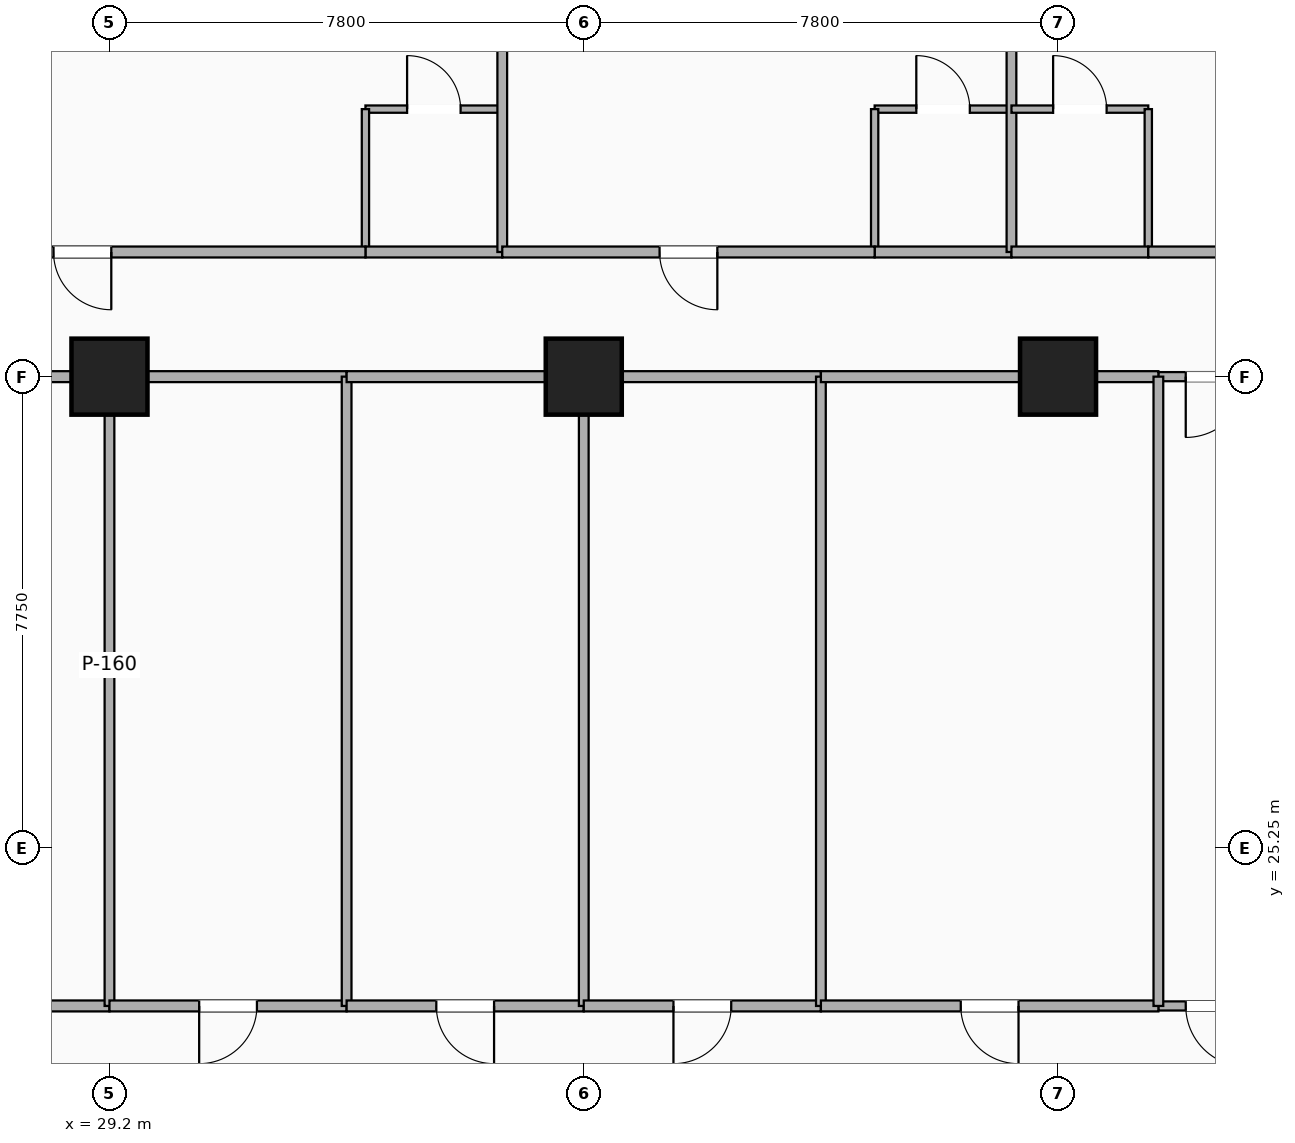
"""IFC4 building model, lengths in metres.
Left out: names, types, materials, properties, quantities, classifications, styles, units other than length and angle.
Written with IfcOpenShell. Run it as: python <this file> out.ifc"""

import sys

from ifc_helpers import new_model, si_unit, direction, frame, frame_2d, origin, origin_2d, place, context, subcontext, project, spatial, rectangle, extrude, element, fill, save


model = new_model("IFC4")
c1 = context("Model", 3, precision=1e-05, world=origin(), true_north=direction((0.0, 1.0)))
c2 = subcontext(c1, "Body", "Model", "MODEL_VIEW")
j1 = project(units=[si_unit("LENGTHUNIT", "METRE"), si_unit("PLANEANGLEUNIT", "RADIAN")], contexts=[c1])
p1 = place(None, origin())
s1 = spatial("IfcSite", under=j1, at=p1, CompositionType="ELEMENT")
p2 = place(p1, origin())
s2 = spatial("IfcBuilding", under=s1, at=p2, CompositionType="ELEMENT")
p3 = place(p2, frame((0.0, 0.0, 91.7)))
s3 = spatial("IfcBuildingStorey", under=s2, at=p3, CompositionType="ELEMENT", Elevation=91.7)
for number, where, z_axis, x_axis in (
    (1, (29.2, 33.0, -0.26), (0.0, 0.0, 1.0), (1.0, 0.0, 0.0)),
    (2, (37.0, 33.0, -0.26), (0.0, 0.0, 1.0), (1.0, 0.0, 0.0)),
    (3, (44.8, 33.0, -0.26), (0.0, 0.0, 1.0), (1.0, 0.0, 0.0)),
):
    element("IfcColumn", number, at=place(p3, frame(where, z_axis=z_axis, x_axis=x_axis)), inside=s3, PredefinedType="COLUMN", context=c2, shape_type="SweptSolid", body=[
        extrude(rectangle(XDim=1.25, YDim=1.25, at=origin_2d()), origin(), (0.0, 0.0, 1.0), 3.5),
    ])
p4 = place(p3, frame((46.45, 22.65, 0.0), z_axis=(0.0, 0.0, 1.0), x_axis=(1.0, 0.0, 0.0)))
e4 = element("IfcWall", 4, at=p4, inside=s3, PredefinedType="PARTITIONING", context=c2, shape_type="SweptSolid", body=[
    extrude(rectangle(XDim=2.0, YDim=0.15, at=frame_2d((1.0, 0.0))), origin(), (0.0, 0.0, 1.0), 3.24),
])
p5 = place(p4, frame((0.45, 0.0, 0.0)))
e5 = element("IfcOpeningElement", 5, at=p5, cuts=e4, PredefinedType="OPENING", context=c2, shape_type="SweptSolid", body=[
    extrude(rectangle(XDim=1.0, YDim=2.15, at=frame_2d((0.5, 1.075))), frame((0.0, 0.085, 0.0), z_axis=(0.0, -1.0, 0.0), x_axis=(1.0, 0.0, 0.0)), (0.0, 0.0, 1.0), 0.17),
])
p6 = place(p3, frame((46.45, 33.0, 0.0), z_axis=(0.0, 0.0, 1.0), x_axis=(1.0, 0.0, 0.0)))
e6 = element("IfcWall", 6, at=p6, inside=s3, PredefinedType="PARTITIONING", context=c2, shape_type="SweptSolid", body=[
    extrude(rectangle(XDim=2.0, YDim=0.15, at=frame_2d((1.0, 0.0))), origin(), (0.0, 0.0, 1.0), 2.313),
])
p7 = place(p6, frame((0.45, 0.0, 0.0)))
e7 = element("IfcOpeningElement", 7, at=p7, cuts=e6, PredefinedType="OPENING", context=c2, shape_type="SweptSolid", body=[
    extrude(rectangle(XDim=1.0, YDim=2.15, at=frame_2d((0.5, 1.075))), frame((0.0, 0.085, 0.0), z_axis=(0.0, -1.0, 0.0), x_axis=(1.0, 0.0, 0.0)), (0.0, 0.0, 1.0), 0.17),
])
p8 = place(p3, frame((18.65, 22.65, 0.0), z_axis=(0.0, 0.0, 1.0), x_axis=(1.0, 0.0, 0.0)))
e8 = element("IfcWall", 8, at=p8, inside=s3, PredefinedType="PARTITIONING", context=c2, shape_type="SweptSolid", body=[
    extrude(rectangle(XDim=10.55, YDim=0.18, at=frame_2d((5.275, 0.0))), origin(), (0.0, 0.0, 1.0), 2.313),
])
p9 = place(p8, frame((4.8, 0.0, 0.0)))
e9 = element("IfcOpeningElement", 9, at=p9, cuts=e8, PredefinedType="OPENING", context=c2, shape_type="SweptSolid", body=[
    extrude(rectangle(XDim=0.95, YDim=2.15, at=frame_2d((0.475, 1.075))), frame((0.0, 0.1, 0.0), z_axis=(0.0, -1.0, 0.0), x_axis=(1.0, 0.0, 0.0)), (0.0, 0.0, 1.0), 0.2),
])
p10 = place(p3, frame((18.65, 33.0, 0.0), z_axis=(0.0, 0.0, 1.0), x_axis=(1.0, 0.0, 0.0)))
e10 = element("IfcWall", 10, at=p10, inside=s3, PredefinedType="PARTITIONING", context=c2, shape_type="SweptSolid", body=[
    extrude(rectangle(XDim=10.55, YDim=0.18, at=frame_2d((5.275, 0.0))), origin(), (0.0, 0.0, 1.0), 2.313),
])
p11 = place(p3, frame((29.2, 22.65, 0.0), z_axis=(0.0, 0.0, 1.0), x_axis=(0.0, 1.0, 0.0)))
e11 = element("IfcWall", 11, at=p11, inside=s3, PredefinedType="PARTITIONING", context=c2, shape_type="SweptSolid", body=[
    extrude(rectangle(XDim=10.35, YDim=0.16, at=frame_2d((5.175, 0.0))), origin(), (0.0, 0.0, 1.0), 2.313),
])
p12 = place(p3, frame((29.2, 22.65, 0.0), z_axis=(0.0, 0.0, 1.0), x_axis=(1.0, 0.0, 0.0)))
e12 = element("IfcWall", 12, at=p12, inside=s3, PredefinedType="PARTITIONING", context=c2, shape_type="SweptSolid", body=[
    extrude(rectangle(XDim=3.9, YDim=0.18, at=frame_2d((1.95, 0.0))), origin(), (0.0, 0.0, 1.0), 2.313),
])
p13 = place(p12, frame((1.475, 0.0, 0.0)))
e13 = element("IfcOpeningElement", 13, at=p13, cuts=e12, PredefinedType="OPENING", context=c2, shape_type="SweptSolid", body=[
    extrude(rectangle(XDim=0.95, YDim=2.15, at=frame_2d((0.475, 1.075))), frame((0.0, 0.1, 0.0), z_axis=(0.0, -1.0, 0.0), x_axis=(1.0, 0.0, 0.0)), (0.0, 0.0, 1.0), 0.2),
])
p14 = place(p3, frame((29.2, 33.0, 0.0), z_axis=(0.0, 0.0, 1.0), x_axis=(1.0, 0.0, 0.0)))
e14 = element("IfcWall", 14, at=p14, inside=s3, PredefinedType="PARTITIONING", context=c2, shape_type="SweptSolid", body=[
    extrude(rectangle(XDim=3.9, YDim=0.18, at=frame_2d((1.95, 0.0))), origin(), (0.0, 0.0, 1.0), 2.313),
])
p15 = place(p3, frame((33.1, 22.65, 0.0), z_axis=(0.0, 0.0, 1.0), x_axis=(0.0, 1.0, 0.0)))
e15 = element("IfcWall", 15, at=p15, inside=s3, PredefinedType="PARTITIONING", context=c2, shape_type="SweptSolid", body=[
    extrude(rectangle(XDim=10.35, YDim=0.16, at=frame_2d((5.175, 0.0))), origin(), (0.0, 0.0, 1.0), 2.614),
])
p16 = place(p3, frame((33.1, 22.65, 0.0), z_axis=(0.0, 0.0, 1.0), x_axis=(1.0, 0.0, 0.0)))
e16 = element("IfcWall", 16, at=p16, inside=s3, PredefinedType="PARTITIONING", context=c2, shape_type="SweptSolid", body=[
    extrude(rectangle(XDim=3.9, YDim=0.18, at=frame_2d((1.95, 0.0))), origin(), (0.0, 0.0, 1.0), 2.313),
])
p17 = place(p16, frame((1.475, 0.0, 0.0)))
e17 = element("IfcOpeningElement", 17, at=p17, cuts=e16, PredefinedType="OPENING", context=c2, shape_type="SweptSolid", body=[
    extrude(rectangle(XDim=0.95, YDim=2.15, at=frame_2d((0.475, 1.075))), frame((0.0, 0.1, 0.0), z_axis=(0.0, -1.0, 0.0), x_axis=(1.0, 0.0, 0.0)), (0.0, 0.0, 1.0), 0.2),
])
p18 = place(p3, frame((33.1, 33.0, 0.0), z_axis=(0.0, 0.0, 1.0), x_axis=(1.0, 0.0, 0.0)))
e18 = element("IfcWall", 18, at=p18, inside=s3, PredefinedType="PARTITIONING", context=c2, shape_type="SweptSolid", body=[
    extrude(rectangle(XDim=3.9, YDim=0.18, at=frame_2d((1.95, 0.0))), origin(), (0.0, 0.0, 1.0), 2.313),
])
p19 = place(p3, frame((37.0, 22.65, 0.0), z_axis=(0.0, 0.0, 1.0), x_axis=(0.0, 1.0, 0.0)))
e19 = element("IfcWall", 19, at=p19, inside=s3, PredefinedType="PARTITIONING", context=c2, shape_type="SweptSolid", body=[
    extrude(rectangle(XDim=10.35, YDim=0.16, at=frame_2d((5.175, 0.0))), origin(), (0.0, 0.0, 1.0), 2.313),
])
p20 = place(p3, frame((37.0, 22.65, 0.0), z_axis=(0.0, 0.0, 1.0), x_axis=(1.0, 0.0, 0.0)))
e20 = element("IfcWall", 20, at=p20, inside=s3, PredefinedType="PARTITIONING", context=c2, shape_type="SweptSolid", body=[
    extrude(rectangle(XDim=3.9, YDim=0.18, at=frame_2d((1.95, 0.0))), origin(), (0.0, 0.0, 1.0), 2.313),
])
p21 = place(p20, frame((1.475, 0.0, 0.0)))
e21 = element("IfcOpeningElement", 21, at=p21, cuts=e20, PredefinedType="OPENING", context=c2, shape_type="SweptSolid", body=[
    extrude(rectangle(XDim=0.95, YDim=2.15, at=frame_2d((0.475, 1.075))), frame((0.0, 0.1, 0.0), z_axis=(0.0, -1.0, 0.0), x_axis=(1.0, 0.0, 0.0)), (0.0, 0.0, 1.0), 0.2),
])
p22 = place(p3, frame((37.0, 33.0, 0.0), z_axis=(0.0, 0.0, 1.0), x_axis=(1.0, 0.0, 0.0)))
e22 = element("IfcWall", 22, at=p22, inside=s3, PredefinedType="PARTITIONING", context=c2, shape_type="SweptSolid", body=[
    extrude(rectangle(XDim=3.9, YDim=0.18, at=frame_2d((1.95, 0.0))), origin(), (0.0, 0.0, 1.0), 2.313),
])
p23 = place(p3, frame((40.9, 22.65, 0.0), z_axis=(0.0, 0.0, 1.0), x_axis=(0.0, 1.0, 0.0)))
e23 = element("IfcWall", 23, at=p23, inside=s3, PredefinedType="PARTITIONING", context=c2, shape_type="SweptSolid", body=[
    extrude(rectangle(XDim=10.35, YDim=0.16, at=frame_2d((5.175, 0.0))), origin(), (0.0, 0.0, 1.0), 2.614),
])
p24 = place(p3, frame((40.9, 22.65, 0.0), z_axis=(0.0, 0.0, 1.0), x_axis=(1.0, 0.0, 0.0)))
e24 = element("IfcWall", 24, at=p24, inside=s3, PredefinedType="PARTITIONING", context=c2, shape_type="SweptSolid", body=[
    extrude(rectangle(XDim=5.55, YDim=0.18, at=frame_2d((2.775, 0.0))), origin(), (0.0, 0.0, 1.0), 2.313),
])
p25 = place(p24, frame((2.3, 0.0, 0.0)))
e25 = element("IfcOpeningElement", 25, at=p25, cuts=e24, PredefinedType="OPENING", context=c2, shape_type="SweptSolid", body=[
    extrude(rectangle(XDim=0.95, YDim=2.15, at=frame_2d((0.475, 1.075))), frame((0.0, 0.1, 0.0), z_axis=(0.0, -1.0, 0.0), x_axis=(1.0, 0.0, 0.0)), (0.0, 0.0, 1.0), 0.2),
])
p26 = place(p3, frame((40.9, 33.0, 0.0), z_axis=(0.0, 0.0, 1.0), x_axis=(1.0, 0.0, 0.0)))
e26 = element("IfcWall", 26, at=p26, inside=s3, PredefinedType="PARTITIONING", context=c2, shape_type="SweptSolid", body=[
    extrude(rectangle(XDim=5.55, YDim=0.18, at=frame_2d((2.775, 0.0))), origin(), (0.0, 0.0, 1.0), 2.313),
])
p27 = place(p3, frame((46.45, 22.65, 0.0), z_axis=(0.0, 0.0, 1.0), x_axis=(0.0, 1.0, 0.0)))
e27 = element("IfcWall", 27, at=p27, inside=s3, PredefinedType="PARTITIONING", context=c2, shape_type="SweptSolid", body=[
    extrude(rectangle(XDim=10.35, YDim=0.16, at=frame_2d((5.175, 0.0))), origin(), (0.0, 0.0, 1.0), 2.313),
])
p28 = place(p3, frame((33.41, 37.4, 0.0), z_axis=(0.0, 0.0, 1.0), x_axis=(1.0, 0.0, 0.0)))
e28 = element("IfcWall", 28, at=p28, inside=s3, PredefinedType="PARTITIONING", context=c2, shape_type="SweptSolid", body=[
    extrude(rectangle(XDim=2.25, YDim=0.12, at=frame_2d((1.125, 0.0))), origin(), (0.0, 0.0, 1.0), 3.24),
])
p29 = place(p28, frame((1.565, 0.0, 0.0), z_axis=(0.0, 0.0, 1.0), x_axis=(-1.0, 0.0, 0.0)))
e29 = element("IfcOpeningElement", 29, at=p29, cuts=e28, PredefinedType="OPENING", context=c2, shape_type="SweptSolid", body=[
    extrude(rectangle(XDim=0.88, YDim=2.08, at=frame_2d((0.44, 1.04))), frame((0.0, 0.07, 0.0), z_axis=(0.0, -1.0, 0.0), x_axis=(1.0, 0.0, 0.0)), (0.0, 0.0, 1.0), 0.14),
])
p30 = place(p3, frame((33.41, 35.05, 0.0), z_axis=(0.0, 0.0, 1.0), x_axis=(0.0, 1.0, 0.0)))
e30 = element("IfcWall", 30, at=p30, inside=s3, PredefinedType="PARTITIONING", context=c2, shape_type="SweptSolid", body=[
    extrude(rectangle(XDim=2.35, YDim=0.12, at=frame_2d((1.175, 0.0))), origin(), (0.0, 0.0, 1.0), 2.922),
])
p31 = place(p3, frame((33.41, 35.05, 0.0), z_axis=(0.0, 0.0, 1.0), x_axis=(1.0, 0.0, 0.0)))
e31 = element("IfcWall", 31, at=p31, inside=s3, PredefinedType="PARTITIONING", context=c2, shape_type="SweptSolid", body=[
    extrude(rectangle(XDim=2.25, YDim=0.18, at=frame_2d((1.125, 0.0))), origin(), (0.0, 0.0, 1.0), 3.24),
])
p32 = place(p3, frame((24.1, 35.05, 0.0), z_axis=(0.0, 0.0, 1.0), x_axis=(1.0, 0.0, 0.0)))
e32 = element("IfcWall", 32, at=p32, inside=s3, PredefinedType="PARTITIONING", context=c2, shape_type="SweptSolid", body=[
    extrude(rectangle(XDim=9.31, YDim=0.18, at=frame_2d((4.655, 0.0))), origin(), (0.0, 0.0, 1.0), 2.313),
])
p33 = place(p32, frame((4.18, 0.0, 0.0)))
e33 = element("IfcOpeningElement", 33, at=p33, cuts=e32, PredefinedType="OPENING", context=c2, shape_type="SweptSolid", body=[
    extrude(rectangle(XDim=0.95, YDim=2.15, at=frame_2d((0.475, 1.075))), frame((0.0, 0.1, 0.0), z_axis=(0.0, -1.0, 0.0), x_axis=(1.0, 0.0, 0.0)), (0.0, 0.0, 1.0), 0.2),
])
p34 = place(p3, frame((35.66, 35.05, 0.0), z_axis=(0.0, 0.0, 1.0), x_axis=(0.0, 1.0, 0.0)))
e34 = element("IfcWall", 34, at=p34, inside=s3, PredefinedType="PARTITIONING", context=c2, shape_type="SweptSolid", body=[
    extrude(rectangle(XDim=11.33, YDim=0.16, at=frame_2d((5.665, 0.0))), origin(), (0.0, 0.0, 1.0), 2.603),
])
p35 = place(p3, frame((41.784, 37.4, 0.0), z_axis=(0.0, 0.0, 1.0), x_axis=(1.0, 0.0, 0.0)))
e35 = element("IfcWall", 35, at=p35, inside=s3, PredefinedType="PARTITIONING", context=c2, shape_type="SweptSolid", body=[
    extrude(rectangle(XDim=2.25, YDim=0.12, at=frame_2d((1.125, 0.0))), origin(), (0.0, 0.0, 1.0), 3.24),
])
p36 = place(p35, frame((1.565, 0.0, 0.0), z_axis=(0.0, 0.0, 1.0), x_axis=(-1.0, 0.0, 0.0)))
e36 = element("IfcOpeningElement", 36, at=p36, cuts=e35, PredefinedType="OPENING", context=c2, shape_type="SweptSolid", body=[
    extrude(rectangle(XDim=0.88, YDim=2.08, at=frame_2d((0.44, 1.04))), frame((0.0, 0.07, 0.0), z_axis=(0.0, -1.0, 0.0), x_axis=(1.0, 0.0, 0.0)), (0.0, 0.0, 1.0), 0.14),
])
p37 = place(p3, frame((41.784, 35.05, 0.0), z_axis=(0.0, 0.0, 1.0), x_axis=(0.0, 1.0, 0.0)))
e37 = element("IfcWall", 37, at=p37, inside=s3, PredefinedType="PARTITIONING", context=c2, shape_type="SweptSolid", body=[
    extrude(rectangle(XDim=2.35, YDim=0.12, at=frame_2d((1.175, 0.0))), origin(), (0.0, 0.0, 1.0), 2.922),
])
p38 = place(p3, frame((41.784, 35.05, 0.0), z_axis=(0.0, 0.0, 1.0), x_axis=(1.0, 0.0, 0.0)))
e38 = element("IfcWall", 38, at=p38, inside=s3, PredefinedType="PARTITIONING", context=c2, shape_type="SweptSolid", body=[
    extrude(rectangle(XDim=2.25, YDim=0.18, at=frame_2d((1.125, 0.0))), origin(), (0.0, 0.0, 1.0), 3.24),
])
p39 = place(p3, frame((35.66, 35.05, 0.0), z_axis=(0.0, 0.0, 1.0), x_axis=(1.0, 0.0, 0.0)))
e39 = element("IfcWall", 39, at=p39, inside=s3, PredefinedType="PARTITIONING", context=c2, shape_type="SweptSolid", body=[
    extrude(rectangle(XDim=6.124, YDim=0.18, at=frame_2d((3.062, 0.0))), origin(), (0.0, 0.0, 1.0), 2.313),
])
p40 = place(p39, frame((2.587, 0.0, 0.0)))
e40 = element("IfcOpeningElement", 40, at=p40, cuts=e39, PredefinedType="OPENING", context=c2, shape_type="SweptSolid", body=[
    extrude(rectangle(XDim=0.95, YDim=2.15, at=frame_2d((0.475, 1.075))), frame((0.0, 0.1, 0.0), z_axis=(0.0, -1.0, 0.0), x_axis=(1.0, 0.0, 0.0)), (0.0, 0.0, 1.0), 0.2),
])
p41 = place(p3, frame((44.034, 35.05, 0.0), z_axis=(0.0, 0.0, 1.0), x_axis=(0.0, 1.0, 0.0)))
e41 = element("IfcWall", 41, at=p41, inside=s3, PredefinedType="PARTITIONING", context=c2, shape_type="SweptSolid", body=[
    extrude(rectangle(XDim=11.33, YDim=0.16, at=frame_2d((5.665, 0.0))), origin(), (0.0, 0.0, 1.0), 2.603),
])
p42 = place(p3, frame((44.034, 37.4, 0.0), z_axis=(0.0, 0.0, 1.0), x_axis=(1.0, 0.0, 0.0)))
e42 = element("IfcWall", 42, at=p42, inside=s3, PredefinedType="PARTITIONING", context=c2, shape_type="SweptSolid", body=[
    extrude(rectangle(XDim=2.25, YDim=0.12, at=frame_2d((1.125, 0.0))), origin(), (0.0, 0.0, 1.0), 2.313),
])
p43 = place(p42, frame((1.565, 0.0, 0.0), z_axis=(0.0, 0.0, 1.0), x_axis=(-1.0, 0.0, 0.0)))
e43 = element("IfcOpeningElement", 43, at=p43, cuts=e42, PredefinedType="OPENING", context=c2, shape_type="SweptSolid", body=[
    extrude(rectangle(XDim=0.88, YDim=2.08, at=frame_2d((0.44, 1.04))), frame((0.0, 0.07, 0.0), z_axis=(0.0, -1.0, 0.0), x_axis=(1.0, 0.0, 0.0)), (0.0, 0.0, 1.0), 0.14),
])
p44 = place(p3, frame((46.284, 35.05, 0.0), z_axis=(0.0, 0.0, 1.0), x_axis=(0.0, 1.0, 0.0)))
e44 = element("IfcWall", 44, at=p44, inside=s3, PredefinedType="PARTITIONING", context=c2, shape_type="SweptSolid", body=[
    extrude(rectangle(XDim=2.35, YDim=0.12, at=frame_2d((1.175, 0.0))), origin(), (0.0, 0.0, 1.0), 3.24),
])
p45 = place(p3, frame((44.034, 35.05, 0.0), z_axis=(0.0, 0.0, 1.0), x_axis=(1.0, 0.0, 0.0)))
e45 = element("IfcWall", 45, at=p45, inside=s3, PredefinedType="PARTITIONING", context=c2, shape_type="SweptSolid", body=[
    extrude(rectangle(XDim=2.25, YDim=0.18, at=frame_2d((1.125, 0.0))), origin(), (0.0, 0.0, 1.0), 2.313),
])
p46 = place(p3, frame((46.284, 35.05, 0.0), z_axis=(0.0, 0.0, 1.0), x_axis=(1.0, 0.0, 0.0)))
e46 = element("IfcWall", 46, at=p46, inside=s3, PredefinedType="PARTITIONING", context=c2, shape_type="SweptSolid", body=[
    extrude(rectangle(XDim=4.716, YDim=0.18, at=frame_2d((2.358, 0.0))), origin(), (0.0, 0.0, 1.0), 3.24),
])
p47 = place(p46, frame((1.883, 0.0, 0.0)))
e47 = element("IfcOpeningElement", 47, at=p47, cuts=e46, PredefinedType="OPENING", context=c2, shape_type="SweptSolid", body=[
    extrude(rectangle(XDim=0.95, YDim=2.15, at=frame_2d((0.475, 1.075))), frame((0.0, 0.1, 0.0), z_axis=(0.0, -1.0, 0.0), x_axis=(1.0, 0.0, 0.0)), (0.0, 0.0, 1.0), 0.2),
])
p48 = place(p5, origin())
e48 = element("IfcDoor", 48, at=p48, inside=s3, OperationType="SINGLE_SWING_RIGHT", PredefinedType="DOOR", context=c2, shape_type="SweptSolid", body=[
    extrude(rectangle(XDim=1.0, YDim=2.15, at=frame_2d((0.5, 1.075))), frame((0.0, 0.025, 0.0), z_axis=(0.0, -1.0, 0.0), x_axis=(1.0, 0.0, 0.0)), (0.0, 0.0, 1.0), 0.05),
])
fill(e5, e48)
p49 = place(p7, origin())
e49 = element("IfcDoor", 49, at=p49, inside=s3, OperationType="SINGLE_SWING_LEFT", PredefinedType="DOOR", context=c2, shape_type="SweptSolid", body=[
    extrude(rectangle(XDim=1.0, YDim=2.15, at=frame_2d((0.5, 1.075))), frame((0.0, 0.025, 0.0), z_axis=(0.0, -1.0, 0.0), x_axis=(1.0, 0.0, 0.0)), (0.0, 0.0, 1.0), 0.05),
])
fill(e7, e49)
p50 = place(p13, origin())
e50 = element("IfcDoor", 50, at=p50, inside=s3, OperationType="SINGLE_SWING_LEFT", PredefinedType="DOOR", context=c2, shape_type="SweptSolid", body=[
    extrude(rectangle(XDim=0.95, YDim=2.15, at=frame_2d((0.475, 1.075))), frame((0.0, 0.025, 0.0), z_axis=(0.0, -1.0, 0.0), x_axis=(1.0, 0.0, 0.0)), (0.0, 0.0, 1.0), 0.05),
])
fill(e13, e50)
p51 = place(p17, origin())
e51 = element("IfcDoor", 51, at=p51, inside=s3, OperationType="SINGLE_SWING_RIGHT", PredefinedType="DOOR", context=c2, shape_type="SweptSolid", body=[
    extrude(rectangle(XDim=0.95, YDim=2.15, at=frame_2d((0.475, 1.075))), frame((0.0, 0.025, 0.0), z_axis=(0.0, -1.0, 0.0), x_axis=(1.0, 0.0, 0.0)), (0.0, 0.0, 1.0), 0.05),
])
fill(e17, e51)
p52 = place(p21, origin())
e52 = element("IfcDoor", 52, at=p52, inside=s3, OperationType="SINGLE_SWING_LEFT", PredefinedType="DOOR", context=c2, shape_type="SweptSolid", body=[
    extrude(rectangle(XDim=0.95, YDim=2.15, at=frame_2d((0.475, 1.075))), frame((0.0, 0.025, 0.0), z_axis=(0.0, -1.0, 0.0), x_axis=(1.0, 0.0, 0.0)), (0.0, 0.0, 1.0), 0.05),
])
fill(e21, e52)
p53 = place(p25, origin())
e53 = element("IfcDoor", 53, at=p53, inside=s3, OperationType="SINGLE_SWING_RIGHT", PredefinedType="DOOR", context=c2, shape_type="SweptSolid", body=[
    extrude(rectangle(XDim=0.95, YDim=2.15, at=frame_2d((0.475, 1.075))), frame((0.0, 0.025, 0.0), z_axis=(0.0, -1.0, 0.0), x_axis=(1.0, 0.0, 0.0)), (0.0, 0.0, 1.0), 0.05),
])
fill(e25, e53)
p54 = place(p29, origin())
e54 = element("IfcDoor", 54, at=p54, inside=s3, OperationType="SINGLE_SWING_LEFT", PredefinedType="DOOR", context=c2, shape_type="SweptSolid", body=[
    extrude(rectangle(XDim=0.88, YDim=2.08, at=frame_2d((0.44, 1.04))), frame((0.0, 0.025, 0.0), z_axis=(0.0, -1.0, 0.0), x_axis=(1.0, 0.0, 0.0)), (0.0, 0.0, 1.0), 0.05),
])
fill(e29, e54)
p55 = place(p33, origin())
e55 = element("IfcDoor", 55, at=p55, inside=s3, OperationType="SINGLE_SWING_RIGHT", PredefinedType="DOOR", context=c2, shape_type="SweptSolid", body=[
    extrude(rectangle(XDim=0.95, YDim=2.15, at=frame_2d((0.475, 1.075))), frame((0.0, 0.025, 0.0), z_axis=(0.0, -1.0, 0.0), x_axis=(1.0, 0.0, 0.0)), (0.0, 0.0, 1.0), 0.05),
])
fill(e33, e55)
p56 = place(p36, origin())
e56 = element("IfcDoor", 56, at=p56, inside=s3, OperationType="SINGLE_SWING_LEFT", PredefinedType="DOOR", context=c2, shape_type="SweptSolid", body=[
    extrude(rectangle(XDim=0.88, YDim=2.08, at=frame_2d((0.44, 1.04))), frame((0.0, 0.025, 0.0), z_axis=(0.0, -1.0, 0.0), x_axis=(1.0, 0.0, 0.0)), (0.0, 0.0, 1.0), 0.05),
])
fill(e36, e56)
p57 = place(p40, origin())
e57 = element("IfcDoor", 57, at=p57, inside=s3, OperationType="SINGLE_SWING_RIGHT", PredefinedType="DOOR", context=c2, shape_type="SweptSolid", body=[
    extrude(rectangle(XDim=0.95, YDim=2.15, at=frame_2d((0.475, 1.075))), frame((0.0, 0.025, 0.0), z_axis=(0.0, -1.0, 0.0), x_axis=(1.0, 0.0, 0.0)), (0.0, 0.0, 1.0), 0.05),
])
fill(e40, e57)
p58 = place(p43, origin())
e58 = element("IfcDoor", 58, at=p58, inside=s3, OperationType="SINGLE_SWING_LEFT", PredefinedType="DOOR", context=c2, shape_type="SweptSolid", body=[
    extrude(rectangle(XDim=0.88, YDim=2.08, at=frame_2d((0.44, 1.04))), frame((0.0, 0.025, 0.0), z_axis=(0.0, -1.0, 0.0), x_axis=(1.0, 0.0, 0.0)), (0.0, 0.0, 1.0), 0.05),
])
fill(e43, e58)
save(model, sys.argv[1])
